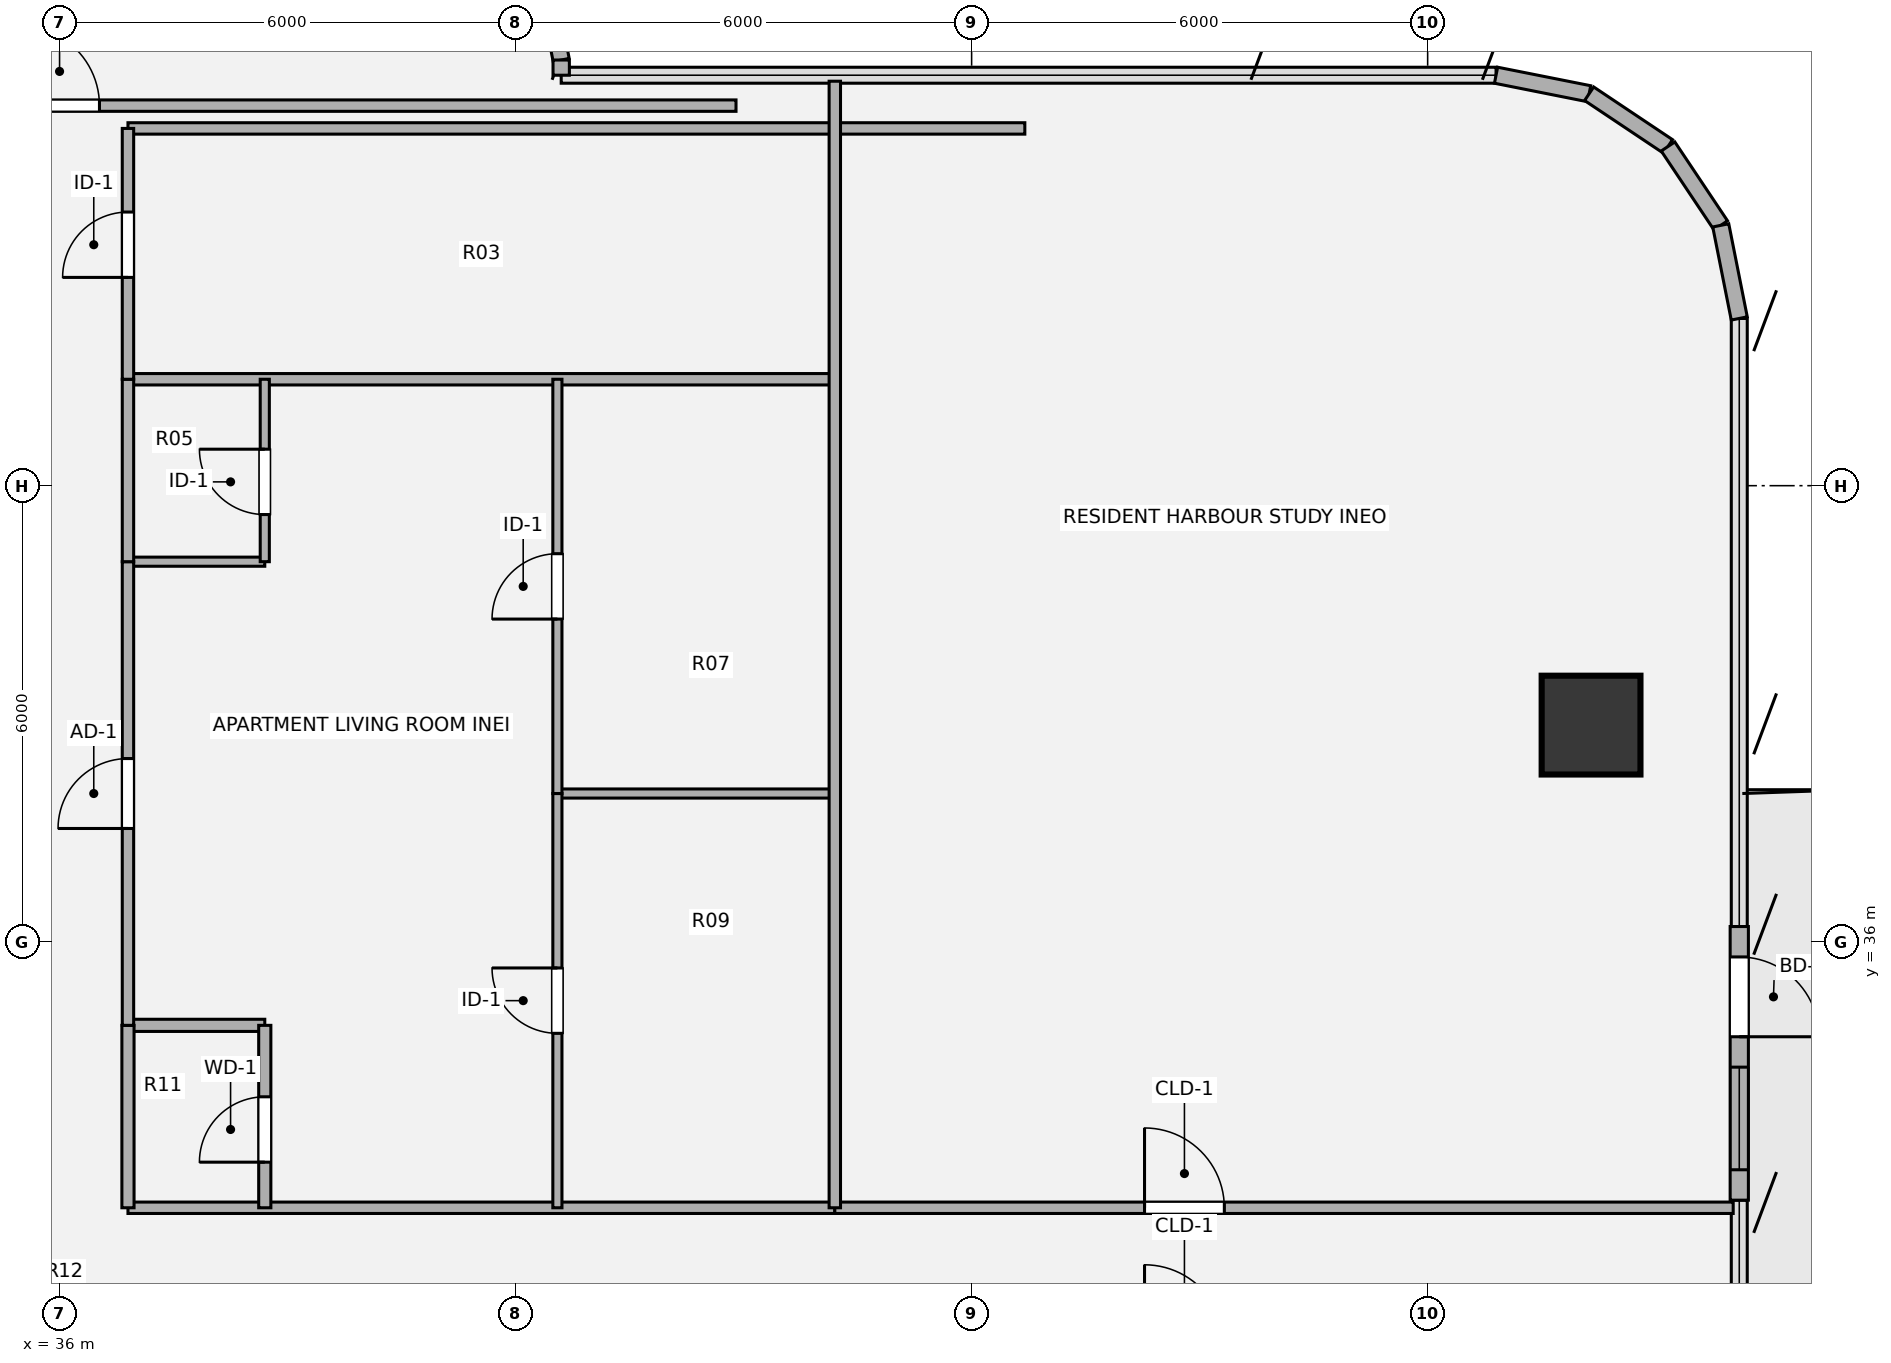
"""IFC4 building model, lengths in metres.
Left out: names, types, materials, properties, quantities, classifications, styles, units other than length and angle.
Written with IfcOpenShell. Run it as: python <this file> out.ifc"""

import sys

from ifc_helpers import new_model, si_unit, direction, frame, frame_2d, origin, origin_2d, place, context, subcontext, project, spatial, rectangle, hollow_circle, extrude, source, transform, mapped, element, fill, save


model = new_model("IFC4")
c1 = context("Model", 3, precision=1e-05, world=origin(), true_north=direction((0.0, 1.0)))
c2 = subcontext(c1, "Body", "Model", "MODEL_VIEW")
j1 = project(units=[si_unit("LENGTHUNIT", "METRE"), si_unit("PLANEANGLEUNIT", "RADIAN")], contexts=[c1])
p1 = place(None, origin())
s1 = spatial("IfcSite", under=j1, at=p1, CompositionType="ELEMENT")
p2 = place(p1, origin())
s2 = spatial("IfcBuilding", under=s1, at=p2, CompositionType="ELEMENT")
p3 = place(p2, frame((0.0, 0.0, 138.96)))
s3 = spatial("IfcBuildingStorey", under=s2, at=p3, CompositionType="ELEMENT", Elevation=138.96)
m1 = source(origin(), c2, "Body", "SweptSolid", [
    extrude(hollow_circle(Radius=0.65, WallThickness=0.045, at=origin_2d()), origin(), (0.0, 0.0, 1.0), 3.78),
])
p4 = place(p3, frame((56.15, 38.85, 0.0), z_axis=(0.0, 0.0, 1.0), x_axis=(1.0, 0.0, 0.0)))
e1 = element("IfcColumn", 1, at=p4, inside=s3, PredefinedType="COLUMN", context=c2, shape_type="MappedRepresentation", body=[
    mapped(m1, transform((0.0, 0.0, 0.0), x_axis=(1.0, 0.0, 0.0), y_axis=(0.0, 1.0, 0.0), z_axis=(0.0, 0.0, 1.0), scale=1.0)),
])
p5 = place(p3, frame((42.387, 48.671, 0.0), z_axis=(0.0, 0.0, 1.0), x_axis=(0.195127417394, -0.980777900945, 0.0)))
e2 = element("IfcWall", 2, at=p5, inside=s3, PredefinedType="SOLIDWALL", context=c2, shape_type="SweptSolid", body=[
    extrude(rectangle(XDim=1.092, YDim=0.215, at=frame_2d((0.546, 0.0))), origin(), (0.0, 0.0, 1.0), 3.53),
])
p6 = place(p3, frame((42.6, 47.6, 0.0), z_axis=(0.0, 0.0, 1.0), x_axis=(0.0, -1.0, 0.0)))
e3 = element("IfcWall", 3, at=p6, inside=s3, PredefinedType="SOLIDWALL", context=c2, shape_type="SweptSolid", body=[
    extrude(rectangle(XDim=0.2, YDim=0.215, at=frame_2d((0.1, 0.0))), origin(), (0.0, 0.0, 1.0), 3.53),
])
for number, where, z_axis, x_axis in (
    (4, (54.9, 47.4, 0.0), (0.0, 0.0, 1.0), (0.981, -0.195, 0.0)),
    (5, (56.125, 47.156, 0.0), (0.0, 0.0, 1.0), (0.831, -0.556, 0.0)),
    (6, (57.163, 46.463, 0.0), (0.0, 0.0, 1.0), (0.556, -0.831, 0.0)),
    (7, (57.856, 45.425, 0.0), (0.0, 0.0, 1.0), (0.195, -0.981, 0.0)),
):
    element("IfcWall", number, at=place(p3, frame(where, z_axis=z_axis, x_axis=x_axis)), inside=s3, PredefinedType="SOLIDWALL", context=c2, shape_type="SweptSolid", body=[
        extrude(rectangle(XDim=1.249, YDim=0.215, at=frame_2d((0.624, 0.0))), origin(), (0.0, 0.0, 1.0), 3.53),
    ])
p7 = place(p3, frame((58.1, 36.2, 0.0), z_axis=(0.0, 0.0, 1.0), x_axis=(0.0, -1.0, 0.0)))
e8 = element("IfcWall", 8, at=p7, inside=s3, PredefinedType="SOLIDWALL", context=c2, shape_type="SweptSolid", body=[
    extrude(rectangle(XDim=3.6, YDim=0.24, at=frame_2d((1.8, 0.0))), origin(), (0.0, 0.0, 1.0), 3.53),
])
p8 = place(p7, frame((0.4, 0.0, 0.0)))
e9 = element("IfcOpeningElement", 9, at=p8, cuts=e8, PredefinedType="OPENING", context=c2, shape_type="SweptSolid", body=[
    extrude(rectangle(XDim=1.05, YDim=2.15, at=origin_2d()), frame((0.525, 0.13, 1.075), z_axis=(0.0, -1.0, 0.0), x_axis=(1.0, 0.0, 0.0)), (0.0, 0.0, 1.0), 0.26),
])
p9 = place(p7, frame((1.85, 0.0, 0.85)))
e10 = element("IfcOpeningElement", 10, at=p9, cuts=e8, PredefinedType="OPENING", context=c2, shape_type="SweptSolid", body=[
    extrude(rectangle(XDim=1.35, YDim=1.35, at=origin_2d()), frame((0.675, 0.13, 0.675), z_axis=(0.0, -1.0, 0.0), x_axis=(1.0, 0.0, 0.0)), (0.0, 0.0, 1.0), 0.26),
])
p10 = place(p3, frame((36.9, 32.5, 0.0), z_axis=(0.0, 0.0, 1.0), x_axis=(1.0, 0.0, 0.0)))
e11 = element("IfcWall", 11, at=p10, inside=s3, PredefinedType="PARTITIONING", context=c2, shape_type="SweptSolid", body=[
    extrude(rectangle(XDim=9.3, YDim=0.15, at=frame_2d((4.65, 0.0))), origin(), (0.0, 0.0, 1.0), 2.982),
])
p11 = place(p3, frame((46.2, 32.5, 0.0), z_axis=(0.0, 0.0, 1.0), x_axis=(1.0, 0.0, 0.0)))
e12 = element("IfcWall", 12, at=p11, inside=s3, PredefinedType="PARTITIONING", context=c2, shape_type="SweptSolid", body=[
    extrude(rectangle(XDim=11.82, YDim=0.15, at=frame_2d((5.91, 0.0))), origin(), (0.0, 0.0, 1.0), 2.982),
])
p12 = place(p11, frame((4.075, 0.0, 0.0)))
e13 = element("IfcOpeningElement", 13, at=p12, cuts=e12, PredefinedType="OPENING", context=c2, shape_type="SweptSolid", body=[
    extrude(rectangle(XDim=1.05, YDim=2.1, at=origin_2d()), frame((0.525, 0.085, 1.05), z_axis=(0.0, -1.0, 0.0), x_axis=(1.0, 0.0, 0.0)), (0.0, 0.0, 1.0), 0.17),
])
p13 = place(p3, frame((36.9, 34.9, 0.0), z_axis=(0.0, 0.0, 1.0), x_axis=(1.0, 0.0, 0.0)))
e14 = element("IfcWall", 14, at=p13, inside=s3, PredefinedType="PLUMBINGWALL", context=c2, shape_type="SweptSolid", body=[
    extrude(rectangle(XDim=1.8, YDim=0.16, at=frame_2d((0.9, 0.0))), origin(), (0.0, 0.0, 1.0), 3.259),
])
p14 = place(p3, frame((42.55, 37.95, 0.0), z_axis=(0.0, 0.0, 1.0), x_axis=(1.0, 0.0, 0.0)))
e15 = element("IfcWall", 15, at=p14, inside=s3, PredefinedType="PARTITIONING", context=c2, shape_type="SweptSolid", body=[
    extrude(rectangle(XDim=3.65, YDim=0.12, at=frame_2d((1.825, 0.0))), origin(), (0.0, 0.0, 1.0), 2.982),
])
p15 = place(p3, frame((36.9, 41.0, 0.0), z_axis=(0.0, 0.0, 1.0), x_axis=(1.0, 0.0, 0.0)))
e16 = element("IfcWall", 16, at=p15, inside=s3, PredefinedType="PARTITIONING", context=c2, shape_type="SweptSolid", body=[
    extrude(rectangle(XDim=1.8, YDim=0.12, at=frame_2d((0.9, 0.0))), origin(), (0.0, 0.0, 1.0), 3.259),
])
p16 = place(p3, frame((36.9, 43.4, 0.0), z_axis=(0.0, 0.0, 1.0), x_axis=(1.0, 0.0, 0.0)))
e17 = element("IfcWall", 17, at=p16, inside=s3, PredefinedType="PARTITIONING", context=c2, shape_type="SweptSolid", body=[
    extrude(rectangle(XDim=9.3, YDim=0.15, at=frame_2d((4.65, 0.0))), origin(), (0.0, 0.0, 1.0), 3.308),
])
p17 = place(p3, frame((36.9, 46.7, 0.0), z_axis=(0.0, 0.0, 1.0), x_axis=(1.0, 0.0, 0.0)))
e18 = element("IfcWall", 18, at=p17, inside=s3, PredefinedType="PARTITIONING", context=c2, shape_type="SweptSolid", body=[
    extrude(rectangle(XDim=11.8, YDim=0.15, at=frame_2d((5.9, 0.0))), origin(), (0.0, 0.0, 1.0), 3.308),
])
p18 = place(p3, frame((27.1, 47.0, 0.0), z_axis=(0.0, 0.0, 1.0), x_axis=(1.0, 0.0, 0.0)))
e19 = element("IfcWall", 19, at=p18, inside=s3, PredefinedType="PARTITIONING", context=c2, shape_type="SweptSolid", body=[
    extrude(rectangle(XDim=17.8, YDim=0.15, at=frame_2d((8.9, 0.0))), origin(), (0.0, 0.0, 1.0), 3.308),
])
p19 = place(p18, frame((8.375, 0.0, 0.0)))
e20 = element("IfcOpeningElement", 20, at=p19, cuts=e19, PredefinedType="OPENING", context=c2, shape_type="SweptSolid", body=[
    extrude(rectangle(XDim=1.05, YDim=2.1, at=origin_2d()), frame((0.525, 0.085, 1.05), z_axis=(0.0, -1.0, 0.0), x_axis=(1.0, 0.0, 0.0)), (0.0, 0.0, 1.0), 0.17),
])
p20 = place(p3, frame((36.9, 32.5, 0.0), z_axis=(0.0, 0.0, 1.0), x_axis=(0.0, 1.0, 0.0)))
e21 = element("IfcWall", 21, at=p20, inside=s3, PredefinedType="PLUMBINGWALL", context=c2, shape_type="SweptSolid", body=[
    extrude(rectangle(XDim=2.4, YDim=0.16, at=frame_2d((1.2, 0.0))), origin(), (0.0, 0.0, 1.0), 3.5),
])
p21 = place(p3, frame((36.9, 34.9, 0.0), z_axis=(0.0, 0.0, 1.0), x_axis=(0.0, 1.0, 0.0)))
e22 = element("IfcWall", 22, at=p21, inside=s3, PredefinedType="PARTITIONING", context=c2, shape_type="SweptSolid", body=[
    extrude(rectangle(XDim=6.1, YDim=0.15, at=frame_2d((3.05, 0.0))), origin(), (0.0, 0.0, 1.0), 3.5),
])
p22 = place(p21, frame((2.59, 0.0, 0.0)))
e23 = element("IfcOpeningElement", 23, at=p22, cuts=e22, PredefinedType="OPENING", context=c2, shape_type="SweptSolid", body=[
    extrude(rectangle(XDim=0.92, YDim=2.1, at=origin_2d()), frame((0.46, 0.085, 1.05), z_axis=(0.0, -1.0, 0.0), x_axis=(1.0, 0.0, 0.0)), (0.0, 0.0, 1.0), 0.17),
])
p23 = place(p3, frame((36.9, 41.0, 0.0), z_axis=(0.0, 0.0, 1.0), x_axis=(0.0, 1.0, 0.0)))
e24 = element("IfcWall", 24, at=p23, inside=s3, PredefinedType="PARTITIONING", context=c2, shape_type="SweptSolid", body=[
    extrude(rectangle(XDim=2.4, YDim=0.15, at=frame_2d((1.2, 0.0))), origin(), (0.0, 0.0, 1.0), 3.5),
])
p24 = place(p3, frame((36.9, 43.4, 0.0), z_axis=(0.0, 0.0, 1.0), x_axis=(0.0, 1.0, 0.0)))
e25 = element("IfcWall", 25, at=p24, inside=s3, PredefinedType="PARTITIONING", context=c2, shape_type="SweptSolid", body=[
    extrude(rectangle(XDim=3.3, YDim=0.15, at=frame_2d((1.65, 0.0))), origin(), (0.0, 0.0, 1.0), 3.5),
])
p25 = place(p24, frame((1.34, 0.0, 0.0)))
e26 = element("IfcOpeningElement", 26, at=p25, cuts=e25, PredefinedType="OPENING", context=c2, shape_type="SweptSolid", body=[
    extrude(rectangle(XDim=0.86, YDim=2.1, at=origin_2d()), frame((0.43, 0.085, 1.05), z_axis=(0.0, -1.0, 0.0), x_axis=(1.0, 0.0, 0.0)), (0.0, 0.0, 1.0), 0.17),
])
p26 = place(p3, frame((38.7, 32.5, 0.0), z_axis=(0.0, 0.0, 1.0), x_axis=(0.0, 1.0, 0.0)))
e27 = element("IfcWall", 27, at=p26, inside=s3, PredefinedType="PLUMBINGWALL", context=c2, shape_type="SweptSolid", body=[
    extrude(rectangle(XDim=2.4, YDim=0.16, at=frame_2d((1.2, 0.0))), origin(), (0.0, 0.0, 1.0), 3.5),
])
p27 = place(p26, frame((0.6, 0.0, 0.0)))
e28 = element("IfcOpeningElement", 28, at=p27, cuts=e27, PredefinedType="OPENING", context=c2, shape_type="SweptSolid", body=[
    extrude(rectangle(XDim=0.86, YDim=2.1, at=origin_2d()), frame((0.43, 0.09, 1.05), z_axis=(0.0, -1.0, 0.0), x_axis=(1.0, 0.0, 0.0)), (0.0, 0.0, 1.0), 0.18),
])
p28 = place(p3, frame((38.7, 41.0, 0.0), z_axis=(0.0, 0.0, 1.0), x_axis=(0.0, 1.0, 0.0)))
e29 = element("IfcWall", 29, at=p28, inside=s3, PredefinedType="PARTITIONING", context=c2, shape_type="SweptSolid", body=[
    extrude(rectangle(XDim=2.4, YDim=0.12, at=frame_2d((1.2, 0.0))), origin(), (0.0, 0.0, 1.0), 3.5),
])
p29 = place(p28, frame((0.62, 0.0, 0.0)))
e30 = element("IfcOpeningElement", 30, at=p29, cuts=e29, PredefinedType="OPENING", context=c2, shape_type="SweptSolid", body=[
    extrude(rectangle(XDim=0.86, YDim=2.1, at=origin_2d()), frame((0.43, 0.07, 1.05), z_axis=(0.0, -1.0, 0.0), x_axis=(1.0, 0.0, 0.0)), (0.0, 0.0, 1.0), 0.14),
])
p30 = place(p3, frame((42.55, 32.5, 0.0), z_axis=(0.0, 0.0, 1.0), x_axis=(0.0, 1.0, 0.0)))
e31 = element("IfcWall", 31, at=p30, inside=s3, PredefinedType="PARTITIONING", context=c2, shape_type="SweptSolid", body=[
    extrude(rectangle(XDim=5.45, YDim=0.12, at=frame_2d((2.725, 0.0))), origin(), (0.0, 0.0, 1.0), 3.5),
])
p31 = place(p30, frame((2.295, 0.0, 0.0)))
e32 = element("IfcOpeningElement", 32, at=p31, cuts=e31, PredefinedType="OPENING", context=c2, shape_type="SweptSolid", body=[
    extrude(rectangle(XDim=0.86, YDim=2.1, at=origin_2d()), frame((0.43, 0.07, 1.05), z_axis=(0.0, -1.0, 0.0), x_axis=(1.0, 0.0, 0.0)), (0.0, 0.0, 1.0), 0.14),
])
p32 = place(p3, frame((42.55, 37.95, 0.0), z_axis=(0.0, 0.0, 1.0), x_axis=(0.0, 1.0, 0.0)))
e33 = element("IfcWall", 33, at=p32, inside=s3, PredefinedType="PARTITIONING", context=c2, shape_type="SweptSolid", body=[
    extrude(rectangle(XDim=5.45, YDim=0.12, at=frame_2d((2.725, 0.0))), origin(), (0.0, 0.0, 1.0), 3.5),
])
p33 = place(p32, frame((2.295, 0.0, 0.0)))
e34 = element("IfcOpeningElement", 34, at=p33, cuts=e33, PredefinedType="OPENING", context=c2, shape_type="SweptSolid", body=[
    extrude(rectangle(XDim=0.86, YDim=2.1, at=origin_2d()), frame((0.43, 0.07, 1.05), z_axis=(0.0, -1.0, 0.0), x_axis=(1.0, 0.0, 0.0)), (0.0, 0.0, 1.0), 0.14),
])
p34 = place(p3, frame((46.2, 32.5, 0.0), z_axis=(0.0, 0.0, 1.0), x_axis=(0.0, 1.0, 0.0)))
e35 = element("IfcWall", 35, at=p34, inside=s3, PredefinedType="PARTITIONING", context=c2, shape_type="SweptSolid", body=[
    extrude(rectangle(XDim=14.821, YDim=0.15, at=frame_2d((7.411, 0.0))), origin(), (0.0, 0.0, 1.0), 3.5),
])
m2 = source(origin(), c2, "Body", "SweptSolid", [
    extrude(rectangle(XDim=1.05, YDim=2.15, at=origin_2d()), frame((0.525, 0.025, 1.075), z_axis=(0.0, -1.0, 0.0), x_axis=(1.0, 0.0, 0.0)), (0.0, 0.0, 1.0), 0.05),
])
p35 = place(p8, origin())
e36 = element("IfcDoor", 36, at=p35, inside=s3, OperationType="SINGLE_SWING_RIGHT", PredefinedType="DOOR", context=c2, shape_type="MappedRepresentation", body=[
    mapped(m2, transform((0.0, 0.0, 0.0), x_axis=(1.0, 0.0, 0.0), y_axis=(0.0, 1.0, 0.0), z_axis=(0.0, 0.0, 1.0), scale=1.0)),
])
fill(e9, e36)
m3 = source(origin(), c2, "Body", "SweptSolid", [
    extrude(rectangle(XDim=1.35, YDim=1.35, at=origin_2d()), frame((0.675, 0.03, 0.675), z_axis=(0.0, -1.0, 0.0), x_axis=(1.0, 0.0, 0.0)), (0.0, 0.0, 1.0), 0.06),
])
p36 = place(p9, origin())
e37 = element("IfcWindow", 37, at=p36, inside=s3, PartitioningType="SINGLE_PANEL", PredefinedType="WINDOW", context=c2, shape_type="MappedRepresentation", body=[
    mapped(m3, transform((0.0, 0.0, 0.0), x_axis=(1.0, 0.0, 0.0), y_axis=(0.0, 1.0, 0.0), z_axis=(0.0, 0.0, 1.0), scale=1.0)),
])
fill(e10, e37)
m4 = source(origin(), c2, "Body", "SweptSolid", [
    extrude(rectangle(XDim=1.05, YDim=2.1, at=origin_2d()), frame((0.525, 0.025, 1.05), z_axis=(0.0, -1.0, 0.0), x_axis=(1.0, 0.0, 0.0)), (0.0, 0.0, 1.0), 0.05),
])
p37 = place(p12, origin())
e38 = element("IfcDoor", 38, at=p37, inside=s3, OperationType="SINGLE_SWING_LEFT", PredefinedType="DOOR", context=c2, shape_type="MappedRepresentation", body=[
    mapped(m4, transform((0.0, 0.0, 0.0), x_axis=(1.0, 0.0, 0.0), y_axis=(0.0, 1.0, 0.0), z_axis=(0.0, 0.0, 1.0), scale=1.0)),
])
fill(e13, e38)
p38 = place(p19, origin())
e39 = element("IfcDoor", 39, at=p38, inside=s3, OperationType="SINGLE_SWING_LEFT", PredefinedType="DOOR", context=c2, shape_type="MappedRepresentation", body=[
    mapped(m4, transform((0.0, 0.0, 0.0), x_axis=(1.0, 0.0, 0.0), y_axis=(0.0, 1.0, 0.0), z_axis=(0.0, 0.0, 1.0), scale=1.0)),
])
fill(e20, e39)
m5 = source(origin(), c2, "Body", "SweptSolid", [
    extrude(rectangle(XDim=0.92, YDim=2.1, at=origin_2d()), frame((0.46, 0.025, 1.05), z_axis=(0.0, -1.0, 0.0), x_axis=(1.0, 0.0, 0.0)), (0.0, 0.0, 1.0), 0.05),
])
p39 = place(p22, origin())
e40 = element("IfcDoor", 40, at=p39, inside=s3, OperationType="SINGLE_SWING_LEFT", PredefinedType="DOOR", context=c2, shape_type="MappedRepresentation", body=[
    mapped(m5, transform((0.0, 0.0, 0.0), x_axis=(1.0, 0.0, 0.0), y_axis=(0.0, 1.0, 0.0), z_axis=(0.0, 0.0, 1.0), scale=1.0)),
])
fill(e23, e40)
m6 = source(origin(), c2, "Body", "SweptSolid", [
    extrude(rectangle(XDim=0.86, YDim=2.1, at=origin_2d()), frame((0.43, 0.025, 1.05), z_axis=(0.0, -1.0, 0.0), x_axis=(1.0, 0.0, 0.0)), (0.0, 0.0, 1.0), 0.05),
])
p40 = place(p25, origin())
e41 = element("IfcDoor", 41, at=p40, inside=s3, OperationType="SINGLE_SWING_LEFT", PredefinedType="DOOR", context=c2, shape_type="MappedRepresentation", body=[
    mapped(m6, transform((0.0, 0.0, 0.0), x_axis=(1.0, 0.0, 0.0), y_axis=(0.0, 1.0, 0.0), z_axis=(0.0, 0.0, 1.0), scale=1.0)),
])
fill(e26, e41)
m7 = source(origin(), c2, "Body", "SweptSolid", [
    extrude(rectangle(XDim=0.86, YDim=2.1, at=origin_2d()), frame((0.43, 0.025, 1.05), z_axis=(0.0, -1.0, 0.0), x_axis=(1.0, 0.0, 0.0)), (0.0, 0.0, 1.0), 0.05),
])
p41 = place(p27, origin())
e42 = element("IfcDoor", 42, at=p41, inside=s3, OperationType="SINGLE_SWING_LEFT", PredefinedType="DOOR", context=c2, shape_type="MappedRepresentation", body=[
    mapped(m7, transform((0.0, 0.0, 0.0), x_axis=(1.0, 0.0, 0.0), y_axis=(0.0, 1.0, 0.0), z_axis=(0.0, 0.0, 1.0), scale=1.0)),
])
fill(e28, e42)
p42 = place(p29, origin())
e43 = element("IfcDoor", 43, at=p42, inside=s3, OperationType="SINGLE_SWING_RIGHT", PredefinedType="DOOR", context=c2, shape_type="MappedRepresentation", body=[
    mapped(m6, transform((0.0, 0.0, 0.0), x_axis=(1.0, 0.0, 0.0), y_axis=(0.0, 1.0, 0.0), z_axis=(0.0, 0.0, 1.0), scale=1.0)),
])
fill(e30, e43)
p43 = place(p31, origin())
e44 = element("IfcDoor", 44, at=p43, inside=s3, OperationType="SINGLE_SWING_RIGHT", PredefinedType="DOOR", context=c2, shape_type="MappedRepresentation", body=[
    mapped(m6, transform((0.0, 0.0, 0.0), x_axis=(1.0, 0.0, 0.0), y_axis=(0.0, 1.0, 0.0), z_axis=(0.0, 0.0, 1.0), scale=1.0)),
])
fill(e32, e44)
p44 = place(p33, origin())
e45 = element("IfcDoor", 45, at=p44, inside=s3, OperationType="SINGLE_SWING_LEFT", PredefinedType="DOOR", context=c2, shape_type="MappedRepresentation", body=[
    mapped(m6, transform((0.0, 0.0, 0.0), x_axis=(1.0, 0.0, 0.0), y_axis=(0.0, 1.0, 0.0), z_axis=(0.0, 0.0, 1.0), scale=1.0)),
])
fill(e34, e45)
save(model, sys.argv[1])
